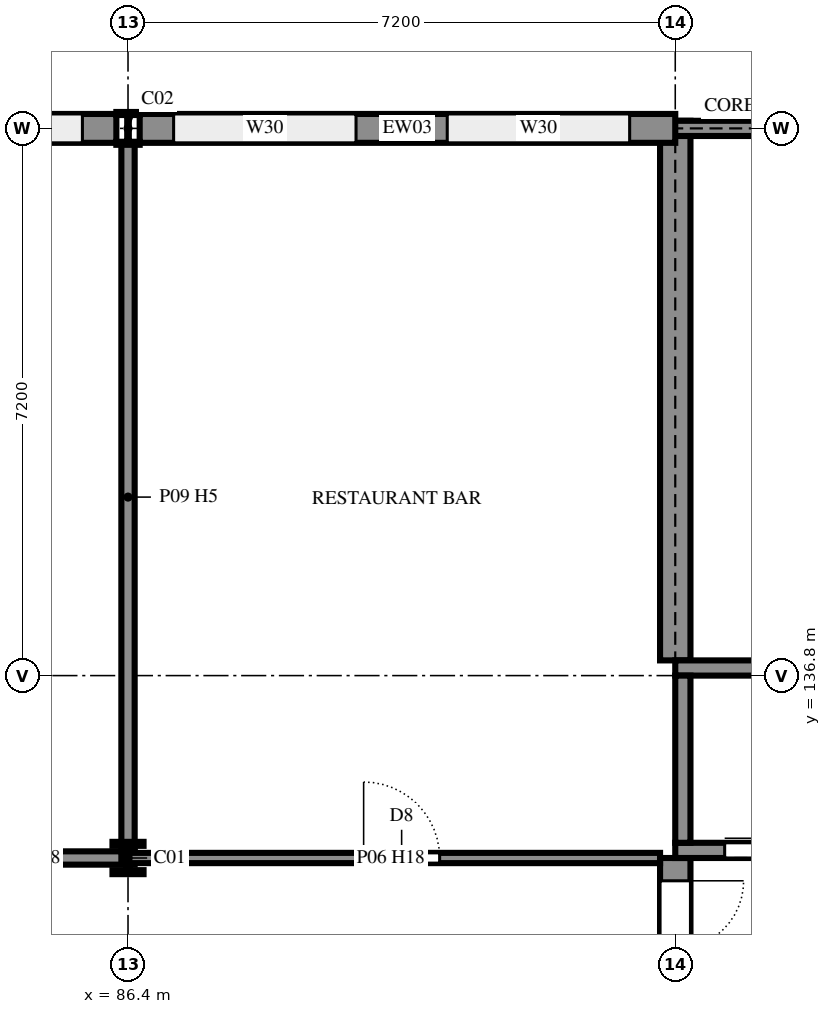
"""IFC4 building model, lengths in metres.
Left out: names, types, materials, properties, quantities, classifications, styles, units other than length and angle.
Written with IfcOpenShell. Run it as: python <this file> out.ifc"""

import sys

from ifc_helpers import new_model, si_unit, direction, frame, frame_2d, origin, origin_2d, place, context, subcontext, project, spatial, rectangle, i_section, extrude, element, fill, save


model = new_model("IFC4")
c1 = context("Model", 3, precision=1e-05, world=origin(), true_north=direction((0.0, 1.0)))
c2 = subcontext(c1, "Body", "Model", "MODEL_VIEW")
j1 = project(units=[si_unit("LENGTHUNIT", "METRE"), si_unit("PLANEANGLEUNIT", "RADIAN")], contexts=[c1])
p1 = place(None, origin())
s1 = spatial("IfcSite", under=j1, at=p1, CompositionType="ELEMENT")
p2 = place(p1, origin())
s2 = spatial("IfcBuilding", under=s1, at=p2, CompositionType="ELEMENT")
p3 = place(p2, frame((0.0, 0.0, 10.8)))
s3 = spatial("IfcBuildingStorey", under=s2, at=p3, CompositionType="ELEMENT", Elevation=10.8)
p4 = place(p3, frame((86.4, 134.4, 0.0), z_axis=(0.0, 0.0, 1.0), x_axis=(1.0, 0.0, 0.0)))
e1 = element("IfcColumn", 1, at=p4, inside=s3, PredefinedType="COLUMN", context=c2, shape_type="SweptSolid", body=[
    extrude(i_section(OverallWidth=0.409, OverallDepth=0.425, WebThickness=0.033, FlangeThickness=0.052, FilletRadius=0.015, at=origin_2d()), origin(), (0.0, 0.0, 1.0), 3.6),
])
p5 = place(p3, frame((86.4, 144.0, 0.0), z_axis=(0.0, 0.0, 1.0), x_axis=(1.0, 0.0, 0.0)))
e2 = element("IfcColumn", 2, at=p5, inside=s3, PredefinedType="COLUMN", context=c2, shape_type="SweptSolid", body=[
    extrude(i_section(OverallWidth=0.307, OverallDepth=0.432, WebThickness=0.021, FlangeThickness=0.04, FilletRadius=0.027, at=origin_2d()), origin(), (0.0, 0.0, 1.0), 3.6),
])
p6 = place(p3, frame((93.6, 132.0, 0.0), z_axis=(0.0, 0.0, 1.0), x_axis=(0.0, 1.0, 0.0)))
e3 = element("IfcWall", 3, at=p6, inside=s3, PredefinedType="SHEAR", context=c2, shape_type="SweptSolid", body=[
    extrude(rectangle(XDim=2.4, YDim=0.4, at=frame_2d((1.2, 0.0))), origin(), (0.0, 0.0, 1.0), 3.6),
])
p7 = place(p6, frame((0.3, 0.0, 0.0)))
e4 = element("IfcOpeningElement", 4, at=p7, cuts=e3, PredefinedType="OPENING", context=c2, shape_type="SweptSolid", body=[
    extrude(rectangle(XDim=1.8, YDim=2.1, at=frame_2d((0.9, 1.05))), frame((0.0, 0.21, 0.0), z_axis=(0.0, -1.0, 0.0), x_axis=(1.0, 0.0, 0.0)), (0.0, 0.0, 1.0), 0.42),
])
p8 = place(p3, frame((93.6, 144.1, 0.0), z_axis=(0.0, 0.0, 1.0), x_axis=(0.0, -1.0, 0.0)))
e5 = element("IfcWall", 5, at=p8, inside=s3, PredefinedType="SHEAR", context=c2, shape_type="SweptSolid", body=[
    extrude(rectangle(XDim=7.1, YDim=0.4, at=frame_2d((3.55, 0.0))), origin(), (0.0, 0.0, 1.0), 3.6),
])
p9 = place(p3, frame((100.975, 144.0, 0.0), z_axis=(0.0, 0.0, 1.0), x_axis=(-1.0, 0.0, 0.0)))
e6 = element("IfcWall", 6, at=p9, inside=s3, PredefinedType="SHEAR", context=c2, shape_type="SweptSolid", body=[
    extrude(rectangle(XDim=7.575, YDim=0.2, at=frame_2d((3.788, 0.0))), origin(), (0.0, 0.0, 1.0), 3.6),
])
p10 = place(p3, frame((93.6, 144.0, 0.0), z_axis=(0.0, 0.0, 1.0), x_axis=(-1.0, 0.0, 0.0)))
e7 = element("IfcWall", 7, at=p10, inside=s3, PredefinedType="SOLIDWALL", context=c2, shape_type="SweptSolid", body=[
    extrude(rectangle(XDim=7.047, YDim=0.38, at=frame_2d((3.523, 0.0))), origin(), (0.0, 0.0, 1.0), 3.16),
])
p11 = place(p10, frame((4.2, 0.0, 0.6)))
e8 = element("IfcOpeningElement", 8, at=p11, cuts=e7, PredefinedType="OPENING", context=c2, shape_type="SweptSolid", body=[
    extrude(rectangle(XDim=2.4, YDim=2.4, at=frame_2d((1.2, 1.2))), frame((0.0, 0.2, 0.0), z_axis=(0.0, -1.0, 0.0), x_axis=(1.0, 0.0, 0.0)), (0.0, 0.0, 1.0), 0.4),
])
p12 = place(p10, frame((0.6, 0.0, 0.6)))
e9 = element("IfcOpeningElement", 9, at=p12, cuts=e7, PredefinedType="OPENING", context=c2, shape_type="SweptSolid", body=[
    extrude(rectangle(XDim=2.4, YDim=2.4, at=frame_2d((1.2, 1.2))), frame((0.0, 0.2, 0.0), z_axis=(0.0, -1.0, 0.0), x_axis=(1.0, 0.0, 0.0)), (0.0, 0.0, 1.0), 0.4),
])
p13 = place(p3, frame((86.247, 144.0, 0.0), z_axis=(0.0, 0.0, 1.0), x_axis=(-1.0, 0.0, 0.0)))
e10 = element("IfcWall", 10, at=p13, inside=s3, PredefinedType="SOLIDWALL", context=c2, shape_type="SweptSolid", body=[
    extrude(rectangle(XDim=6.893, YDim=0.38, at=frame_2d((3.447, 0.0))), origin(), (0.0, 0.0, 1.0), 3.16),
])
p14 = place(p13, frame((4.046, 0.0, 0.6)))
e11 = element("IfcOpeningElement", 11, at=p14, cuts=e10, PredefinedType="OPENING", context=c2, shape_type="SweptSolid", body=[
    extrude(rectangle(XDim=2.4, YDim=2.4, at=frame_2d((1.2, 1.2))), frame((0.0, 0.2, 0.0), z_axis=(0.0, -1.0, 0.0), x_axis=(1.0, 0.0, 0.0)), (0.0, 0.0, 1.0), 0.4),
])
p15 = place(p13, frame((0.447, 0.0, 0.6)))
e12 = element("IfcOpeningElement", 12, at=p15, cuts=e10, PredefinedType="OPENING", context=c2, shape_type="SweptSolid", body=[
    extrude(rectangle(XDim=2.4, YDim=2.4, at=frame_2d((1.2, 1.2))), frame((0.0, 0.2, 0.0), z_axis=(0.0, -1.0, 0.0), x_axis=(1.0, 0.0, 0.0)), (0.0, 0.0, 1.0), 0.4),
])
p16 = place(p3, frame((93.6, 134.5, 0.0), z_axis=(0.0, 0.0, 1.0), x_axis=(1.0, 0.0, 0.0)))
e13 = element("IfcWall", 13, at=p16, inside=s3, PredefinedType="SHEAR", context=c2, shape_type="SweptSolid", body=[
    extrude(rectangle(XDim=2.4, YDim=0.2, at=frame_2d((1.2, 0.0))), origin(), (0.0, 0.0, 1.0), 3.6),
])
p17 = place(p16, frame((0.65, 0.0, 0.0)))
e14 = element("IfcOpeningElement", 14, at=p17, cuts=e13, PredefinedType="OPENING", context=c2, shape_type="SweptSolid", body=[
    extrude(rectangle(XDim=1.1, YDim=2.1, at=frame_2d((0.55, 1.05))), frame((0.0, 0.11, 0.0), z_axis=(0.0, -1.0, 0.0), x_axis=(1.0, 0.0, 0.0)), (0.0, 0.0, 1.0), 0.22),
])
p18 = place(p3, frame((93.6, 136.9, 0.0), z_axis=(0.0, 0.0, 1.0), x_axis=(1.0, 0.0, 0.0)))
e15 = element("IfcWall", 15, at=p18, inside=s3, PredefinedType="SHEAR", context=c2, shape_type="SweptSolid", body=[
    extrude(rectangle(XDim=2.4, YDim=0.2, at=frame_2d((1.2, 0.0))), origin(), (0.0, 0.0, 1.0), 3.6),
])
p19 = place(p3, frame((93.7, 134.6, 0.0), z_axis=(0.0, 0.0, 1.0), x_axis=(0.0, 1.0, 0.0)))
e16 = element("IfcWall", 16, at=p19, inside=s3, PredefinedType="SHEAR", context=c2, shape_type="SweptSolid", body=[
    extrude(rectangle(XDim=2.2, YDim=0.2, at=frame_2d((1.1, 0.0))), origin(), (0.0, 0.0, 1.0), 3.6),
])
p20 = place(p3, frame((83.63, 134.4, 0.0), z_axis=(0.0, 0.0, 1.0), x_axis=(1.0, 0.0, 0.0)))
e17 = element("IfcWall", 17, at=p20, inside=s3, PredefinedType="PARTITIONING", context=c2, shape_type="SweptSolid", body=[
    extrude(rectangle(XDim=2.858, YDim=0.175, at=frame_2d((1.429, 0.0))), origin(), (0.0, 0.0, 1.0), 3.159),
])
p21 = place(p3, frame((86.312, 134.4, 0.0), z_axis=(0.0, 0.0, 1.0), x_axis=(1.0, 0.0, 0.0)))
e18 = element("IfcWall", 18, at=p21, inside=s3, PredefinedType="PARTITIONING", context=c2, shape_type="SweptSolid", body=[
    extrude(rectangle(XDim=7.087, YDim=0.135, at=frame_2d((3.544, 0.0))), origin(), (0.0, 0.0, 1.0), 3.159),
])
p22 = place(p21, frame((3.188, 0.0, 0.0)))
e19 = element("IfcOpeningElement", 19, at=p22, cuts=e18, PredefinedType="OPENING", context=c2, shape_type="SweptSolid", body=[
    extrude(rectangle(XDim=1.0, YDim=2.4, at=frame_2d((0.5, 1.2))), frame((0.0, 0.077, 0.0), z_axis=(0.0, -1.0, 0.0), x_axis=(1.0, 0.0, 0.0)), (0.0, 0.0, 1.0), 0.155),
])
p23 = place(p3, frame((86.4, 134.488, 0.0), z_axis=(0.0, 0.0, 1.0), x_axis=(0.0, 1.0, 0.0)))
e20 = element("IfcWall", 20, at=p23, inside=s3, PredefinedType="PARTITIONING", context=c2, shape_type="SweptSolid", body=[
    extrude(rectangle(XDim=9.323, YDim=0.175, at=frame_2d((4.661, 0.0))), origin(), (0.0, 0.0, 1.0), 3.06),
])
p24 = place(p11, origin())
e21 = element("IfcWindow", 21, at=p24, inside=s3, PartitioningType="SINGLE_PANEL", PredefinedType="WINDOW", context=c2, shape_type="SweptSolid", body=[
    extrude(rectangle(XDim=2.4, YDim=2.4, at=frame_2d((1.2, 1.2))), frame((0.0, 0.03, 0.0), z_axis=(0.0, -1.0, 0.0), x_axis=(1.0, 0.0, 0.0)), (0.0, 0.0, 1.0), 0.06),
])
fill(e8, e21)
p25 = place(p12, origin())
e22 = element("IfcWindow", 22, at=p25, inside=s3, PartitioningType="SINGLE_PANEL", PredefinedType="WINDOW", context=c2, shape_type="SweptSolid", body=[
    extrude(rectangle(XDim=2.4, YDim=2.4, at=frame_2d((1.2, 1.2))), frame((0.0, 0.03, 0.0), z_axis=(0.0, -1.0, 0.0), x_axis=(1.0, 0.0, 0.0)), (0.0, 0.0, 1.0), 0.06),
])
fill(e9, e22)
p26 = place(p15, origin())
e23 = element("IfcWindow", 23, at=p26, inside=s3, PartitioningType="SINGLE_PANEL", PredefinedType="WINDOW", context=c2, shape_type="SweptSolid", body=[
    extrude(rectangle(XDim=2.4, YDim=2.4, at=frame_2d((1.2, 1.2))), frame((0.0, 0.03, 0.0), z_axis=(0.0, -1.0, 0.0), x_axis=(1.0, 0.0, 0.0)), (0.0, 0.0, 1.0), 0.06),
])
fill(e12, e23)
p27 = place(p17, origin())
e24 = element("IfcDoor", 24, at=p27, inside=s3, OperationType="SLIDING_TO_LEFT", PredefinedType="DOOR", context=c2, shape_type="SweptSolid", body=[
    extrude(rectangle(XDim=1.1, YDim=2.1, at=frame_2d((0.55, 1.05))), frame((0.0, 0.025, 0.0), z_axis=(0.0, -1.0, 0.0), x_axis=(1.0, 0.0, 0.0)), (0.0, 0.0, 1.0), 0.05),
])
fill(e14, e24)
p28 = place(p22, origin())
e25 = element("IfcDoor", 25, at=p28, inside=s3, OperationType="SINGLE_SWING_RIGHT", PredefinedType="DOOR", context=c2, shape_type="SweptSolid", body=[
    extrude(rectangle(XDim=1.0, YDim=2.4, at=frame_2d((0.5, 1.2))), frame((0.0, 0.025, 0.0), z_axis=(0.0, -1.0, 0.0), x_axis=(1.0, 0.0, 0.0)), (0.0, 0.0, 1.0), 0.05),
])
fill(e19, e25)
p29 = place(p7, frame((1.8, 0.0, 0.0), z_axis=(0.0, 0.0, 1.0), x_axis=(-1.0, 0.0, 0.0)))
e26 = element("IfcDoor", 26, at=p29, inside=s3, OperationType="DOUBLE_DOOR_SINGLE_SWING", PredefinedType="DOOR", context=c2, shape_type="SweptSolid", body=[
    extrude(rectangle(XDim=1.8, YDim=2.1, at=frame_2d((0.9, 1.05))), frame((0.0, 0.025, 0.0), z_axis=(0.0, -1.0, 0.0), x_axis=(1.0, 0.0, 0.0)), (0.0, 0.0, 1.0), 0.05),
])
fill(e4, e26)
save(model, sys.argv[1])
